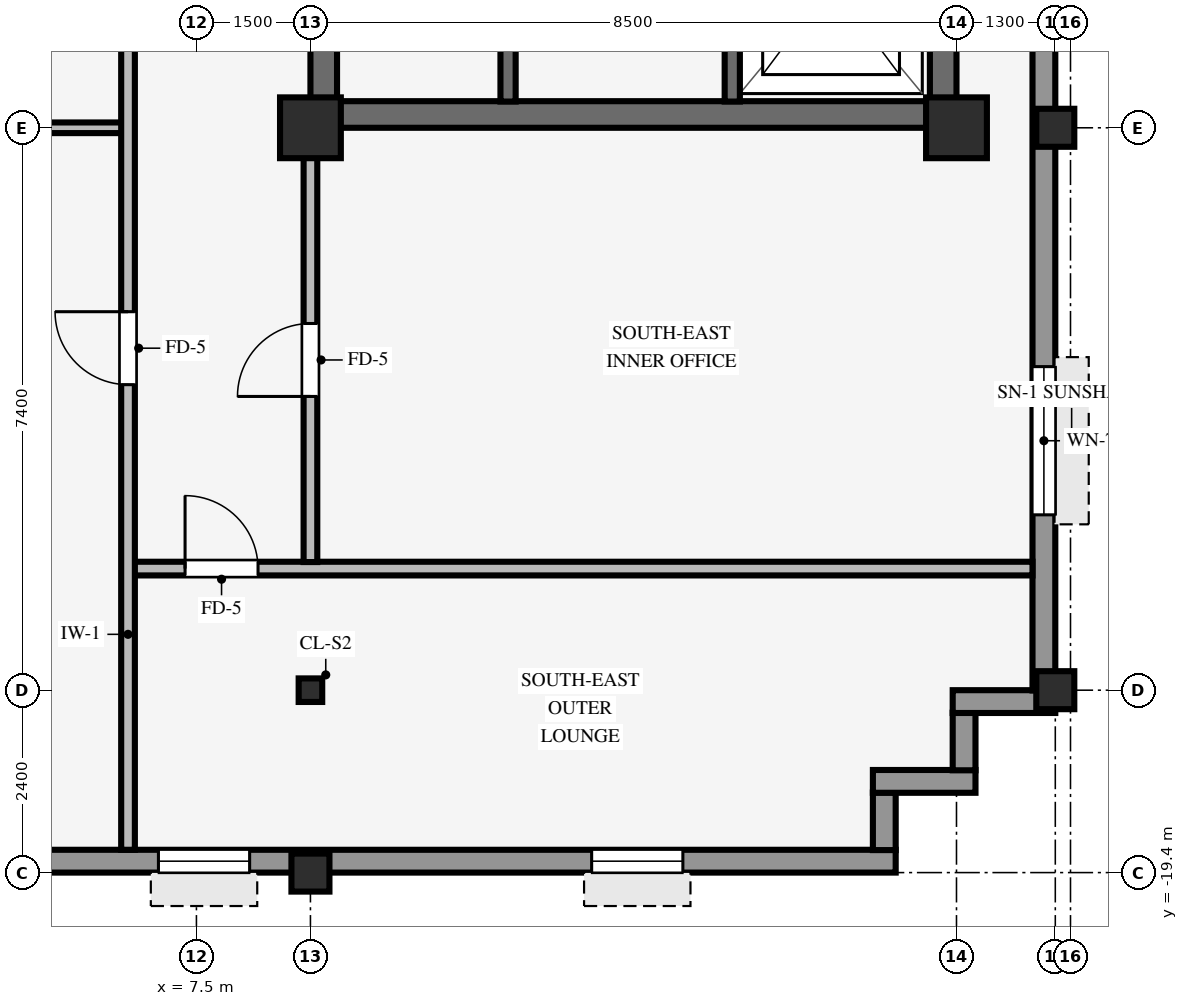
"""IFC4 building model, lengths in metres.
Left out: names, types, materials, properties, quantities, classifications, styles, units other than length and angle.
Written with IfcOpenShell. Run it as: python <this file> out.ifc"""

import sys

from ifc_helpers import new_model, si_unit, direction, frame, frame_2d, origin, origin_2d, place, context, subcontext, project, spatial, rectangle, hollow_rectangle, i_section, extrude, source, transform, mapped, element, fill, save


model = new_model("IFC4")
c1 = context("Model", 3, precision=1e-05, world=origin(), true_north=direction((0.0, 1.0)))
c2 = subcontext(c1, "Body", "Model", "MODEL_VIEW")
j1 = project(units=[si_unit("LENGTHUNIT", "METRE"), si_unit("PLANEANGLEUNIT", "RADIAN")], contexts=[c1])
p1 = place(None, origin())
s1 = spatial("IfcSite", under=j1, at=p1, CompositionType="ELEMENT")
p2 = place(p1, origin())
s2 = spatial("IfcBuilding", under=s1, at=p2, CompositionType="ELEMENT")
p3 = place(p2, frame((0.0, 0.0, 272.55)))
s3 = spatial("IfcBuildingStorey", under=s2, at=p3, CompositionType="ELEMENT", Elevation=272.55)
p4 = place(p3, frame((9.0, -9.425, 0.0), z_axis=(0.0, 0.0, 1.0), x_axis=(1.0, 0.0, 0.0)))
e1 = element("IfcWall", 1, at=p4, inside=s3, PredefinedType="SHEAR", context=c2, shape_type="SweptSolid", body=[
    extrude(rectangle(XDim=8.5, YDim=0.35, at=frame_2d((4.25, 0.0))), origin(), (0.0, 0.0, 1.0), 3.37),
])
p5 = place(p3, frame((9.175, -9.255, 0.0), z_axis=(0.0, 0.0, 1.0), x_axis=(0.0, 1.0, 0.0)))
e2 = element("IfcWall", 2, at=p5, inside=s3, PredefinedType="SHEAR", context=c2, shape_type="SweptSolid", body=[
    extrude(rectangle(XDim=18.51, YDim=0.35, at=frame_2d((9.255, 0.0))), origin(), (0.0, 0.0, 1.0), 3.37),
])
p6 = place(p5, frame((8.655, 0.0, 0.0)))
e3 = element("IfcOpeningElement", 3, at=p6, cuts=e2, PredefinedType="OPENING", context=c2, shape_type="SweptSolid", body=[
    extrude(rectangle(XDim=1.2, YDim=2.15, at=frame_2d((0.6, 1.075))), frame((0.0, 0.185, 0.0), z_axis=(0.0, -1.0, 0.0), x_axis=(1.0, 0.0, 0.0)), (0.0, 0.0, 1.0), 0.37),
])
p7 = place(p3, frame((17.325, -9.255, 0.0), z_axis=(0.0, 0.0, 1.0), x_axis=(0.0, 1.0, 0.0)))
e4 = element("IfcWall", 4, at=p7, inside=s3, PredefinedType="SHEAR", context=c2, shape_type="SweptSolid", body=[
    extrude(rectangle(XDim=18.51, YDim=0.35, at=frame_2d((9.255, 0.0))), origin(), (0.0, 0.0, 1.0), 3.37),
])
for number, where, z_axis, x_axis in (
    (5, (9.0, -9.6, 0.0), (0.0, 0.0, 1.0), (1.0, 0.0, 0.0)),
    (6, (17.5, -9.6, 0.0), (0.0, 0.0, 1.0), (1.0, 0.0, 0.0)),
):
    element("IfcColumn", number, at=place(p3, frame(where, z_axis=z_axis, x_axis=x_axis)), inside=s3, PredefinedType="COLUMN", context=c2, shape_type="SweptSolid", body=[
        extrude(rectangle(XDim=0.8, YDim=0.8, at=origin_2d()), origin(), (0.0, 0.0, 1.0), 3.37),
    ])
for number, where, z_axis, x_axis in (
    (7, (18.8, -17.0, 0.0), (0.0, 0.0, 1.0), (1.0, 0.0, 0.0)),
    (8, (18.8, -9.6, 0.0), (0.0, 0.0, 1.0), (1.0, 0.0, 0.0)),
    (9, (9.0, -19.4, 0.0), (0.0, 0.0, 1.0), (1.0, 0.0, 0.0)),
):
    element("IfcColumn", number, at=place(p3, frame(where, z_axis=z_axis, x_axis=x_axis)), inside=s3, PredefinedType="COLUMN", context=c2, shape_type="SweptSolid", body=[
        extrude(hollow_rectangle(XDim=0.5, YDim=0.5, WallThickness=0.032, InnerFilletRadius=0.032, OuterFilletRadius=0.064, at=origin_2d()), origin(), (0.0, 0.0, 1.0), 3.37),
    ])
p8 = place(p3, frame((9.0, -17.0, 0.0), z_axis=(0.0, 0.0, 1.0), x_axis=(1.0, 0.0, 0.0)))
e10 = element("IfcColumn", 10, at=p8, inside=s3, PredefinedType="COLUMN", context=c2, shape_type="SweptSolid", body=[
    extrude(i_section(OverallWidth=0.31, OverallDepth=0.31, WebThickness=0.015, FlangeThickness=0.015, FilletRadius=0.015, at=origin_2d()), origin(), (0.0, 0.0, 1.0), 3.37),
])
p9 = place(p3, frame((-18.9, -19.25, 0.0), z_axis=(0.0, 0.0, 1.0), x_axis=(1.0, 0.0, 0.0)))
e11 = element("IfcWall", 11, at=p9, inside=s3, PredefinedType="STANDARD", context=c2, shape_type="SweptSolid", body=[
    extrude(rectangle(XDim=35.6, YDim=0.3, at=frame_2d((17.8, 0.0))), origin(), (0.0, 0.0, 1.0), 2.705),
])
p10 = place(p9, frame((1.9, 0.0, 0.8)))
e12 = element("IfcOpeningElement", 12, at=p10, cuts=e11, PredefinedType="OPENING", context=c2, shape_type="SweptSolid", body=[
    extrude(rectangle(XDim=1.2, YDim=1.48, at=frame_2d((0.6, 0.74))), frame((0.0, 0.16, 0.0), z_axis=(0.0, -1.0, 0.0), x_axis=(1.0, 0.0, 0.0)), (0.0, 0.0, 1.0), 0.32),
])
p11 = place(p9, frame((7.6, 0.0, 0.8)))
e13 = element("IfcOpeningElement", 13, at=p11, cuts=e11, PredefinedType="OPENING", context=c2, shape_type="SweptSolid", body=[
    extrude(rectangle(XDim=1.2, YDim=1.48, at=frame_2d((0.6, 0.74))), frame((0.0, 0.16, 0.0), z_axis=(0.0, -1.0, 0.0), x_axis=(1.0, 0.0, 0.0)), (0.0, 0.0, 1.0), 0.32),
])
p12 = place(p9, frame((12.85, 0.0, 0.8)))
e14 = element("IfcOpeningElement", 14, at=p12, cuts=e11, PredefinedType="OPENING", context=c2, shape_type="SweptSolid", body=[
    extrude(rectangle(XDim=1.2, YDim=1.48, at=frame_2d((0.6, 0.74))), frame((0.0, 0.16, 0.0), z_axis=(0.0, -1.0, 0.0), x_axis=(1.0, 0.0, 0.0)), (0.0, 0.0, 1.0), 0.32),
])
p13 = place(p9, frame((22.0, 0.0, 0.8)))
e15 = element("IfcOpeningElement", 15, at=p13, cuts=e11, PredefinedType="OPENING", context=c2, shape_type="SweptSolid", body=[
    extrude(rectangle(XDim=1.2, YDim=1.48, at=frame_2d((0.6, 0.74))), frame((0.0, 0.16, 0.0), z_axis=(0.0, -1.0, 0.0), x_axis=(1.0, 0.0, 0.0)), (0.0, 0.0, 1.0), 0.32),
])
p14 = place(p9, frame((25.9, 0.0, 0.8)))
e16 = element("IfcOpeningElement", 16, at=p14, cuts=e11, PredefinedType="OPENING", context=c2, shape_type="SweptSolid", body=[
    extrude(rectangle(XDim=1.2, YDim=1.48, at=frame_2d((0.6, 0.74))), frame((0.0, 0.16, 0.0), z_axis=(0.0, -1.0, 0.0), x_axis=(1.0, 0.0, 0.0)), (0.0, 0.0, 1.0), 0.32),
])
p15 = place(p9, frame((31.6, 0.0, 0.8)))
e17 = element("IfcOpeningElement", 17, at=p15, cuts=e11, PredefinedType="OPENING", context=c2, shape_type="SweptSolid", body=[
    extrude(rectangle(XDim=1.2, YDim=1.48, at=frame_2d((0.6, 0.74))), frame((0.0, 0.16, 0.0), z_axis=(0.0, -1.0, 0.0), x_axis=(1.0, 0.0, 0.0)), (0.0, 0.0, 1.0), 0.32),
])
p16 = place(p3, frame((16.55, -19.104, 0.0), z_axis=(0.0, 0.0, 1.0), x_axis=(0.0, 1.0, 0.0)))
e18 = element("IfcWall", 18, at=p16, inside=s3, PredefinedType="STANDARD", context=c2, shape_type="SweptSolid", body=[
    extrude(rectangle(XDim=0.758, YDim=0.3, at=frame_2d((0.379, 0.0))), origin(), (0.0, 0.0, 1.0), 2.892),
])
p17 = place(p3, frame((16.4, -18.2, 0.0), z_axis=(0.0, 0.0, 1.0), x_axis=(1.0, 0.0, 0.0)))
e19 = element("IfcWall", 19, at=p17, inside=s3, PredefinedType="STANDARD", context=c2, shape_type="SweptSolid", body=[
    extrude(rectangle(XDim=1.35, YDim=0.3, at=frame_2d((0.675, 0.0))), origin(), (0.0, 0.0, 1.0), 2.892),
])
p18 = place(p3, frame((17.6, -18.054, 0.0), z_axis=(0.0, 0.0, 1.0), x_axis=(0.0, 1.0, 0.0)))
e20 = element("IfcWall", 20, at=p18, inside=s3, PredefinedType="STANDARD", context=c2, shape_type="SweptSolid", body=[
    extrude(rectangle(XDim=0.758, YDim=0.3, at=frame_2d((0.379, 0.0))), origin(), (0.0, 0.0, 1.0), 2.892),
])
p19 = place(p3, frame((17.45, -17.15, 0.0), z_axis=(0.0, 0.0, 1.0), x_axis=(1.0, 0.0, 0.0)))
e21 = element("IfcWall", 21, at=p19, inside=s3, PredefinedType="STANDARD", context=c2, shape_type="SweptSolid", body=[
    extrude(rectangle(XDim=1.35, YDim=0.3, at=frame_2d((0.675, 0.0))), origin(), (0.0, 0.0, 1.0), 2.892),
])
p20 = place(p3, frame((18.65, -17.004, 0.0), z_axis=(0.0, 0.0, 1.0), x_axis=(0.0, 1.0, 0.0)))
e22 = element("IfcWall", 22, at=p20, inside=s3, PredefinedType="STANDARD", context=c2, shape_type="SweptSolid", body=[
    extrude(rectangle(XDim=34.008, YDim=0.3, at=frame_2d((17.004, 0.0))), origin(), (0.0, 0.0, 1.0), 2.705),
])
p21 = place(p20, frame((2.311, 0.0, 0.8)))
e23 = element("IfcOpeningElement", 23, at=p21, cuts=e22, PredefinedType="OPENING", context=c2, shape_type="SweptSolid", body=[
    extrude(rectangle(XDim=1.95, YDim=1.48, at=frame_2d((0.975, 0.74))), frame((0.0, 0.16, 0.0), z_axis=(0.0, -1.0, 0.0), x_axis=(1.0, 0.0, 0.0)), (0.0, 0.0, 1.0), 0.32),
])
p22 = place(p20, frame((29.747, 0.0, 0.8)))
e24 = element("IfcOpeningElement", 24, at=p22, cuts=e22, PredefinedType="OPENING", context=c2, shape_type="SweptSolid", body=[
    extrude(rectangle(XDim=1.95, YDim=1.48, at=frame_2d((0.975, 0.74))), frame((0.0, 0.16, 0.0), z_axis=(0.0, -1.0, 0.0), x_axis=(1.0, 0.0, 0.0)), (0.0, 0.0, 1.0), 0.32),
])
p23 = place(p3, frame((14.55, -9.255, 0.0), z_axis=(0.0, 0.0, 1.0), x_axis=(0.0, 1.0, 0.0)))
e25 = element("IfcWall", 25, at=p23, inside=s3, PredefinedType="SHEAR", context=c2, shape_type="SweptSolid", body=[
    extrude(rectangle(XDim=10.16, YDim=0.2, at=frame_2d((5.08, 0.0))), origin(), (0.0, 0.0, 1.0), 3.37),
])
p24 = place(p23, frame((6.615, 0.0, 0.0)))
e26 = element("IfcOpeningElement", 26, at=p24, cuts=e25, PredefinedType="OPENING", context=c2, shape_type="SweptSolid", body=[
    extrude(rectangle(XDim=0.88, YDim=2.1, at=frame_2d((0.44, 1.05))), frame((0.0, 0.11, 0.0), z_axis=(0.0, -1.0, 0.0), x_axis=(1.0, 0.0, 0.0)), (0.0, 0.0, 1.0), 0.22),
])
p25 = place(p23, frame((0.98, 0.0, 0.0)))
e27 = element("IfcOpeningElement", 27, at=p25, cuts=e25, PredefinedType="OPENING", context=c2, shape_type="SweptSolid", body=[
    extrude(rectangle(XDim=1.15, YDim=2.15, at=frame_2d((0.575, 1.075))), frame((0.0, 0.11, 0.0), z_axis=(0.0, -1.0, 0.0), x_axis=(1.0, 0.0, 0.0)), (0.0, 0.0, 1.0), 0.22),
])
p26 = place(p3, frame((11.6, -9.255, 0.0), z_axis=(0.0, 0.0, 1.0), x_axis=(0.0, 1.0, 0.0)))
e28 = element("IfcWall", 28, at=p26, inside=s3, PredefinedType="SHEAR", context=c2, shape_type="SweptSolid", body=[
    extrude(rectangle(XDim=8.025, YDim=0.2, at=frame_2d((4.012, 0.0))), origin(), (0.0, 0.0, 1.0), 3.37),
])
p27 = place(p26, frame((5.615, 0.0, 0.0)))
e29 = element("IfcOpeningElement", 29, at=p27, cuts=e28, PredefinedType="OPENING", context=c2, shape_type="SweptSolid", body=[
    extrude(rectangle(XDim=0.88, YDim=2.1, at=frame_2d((0.44, 1.05))), frame((0.0, 0.11, 0.0), z_axis=(0.0, -1.0, 0.0), x_axis=(1.0, 0.0, 0.0)), (0.0, 0.0, 1.0), 0.22),
])
p28 = place(p3, frame((6.661, -15.4, 0.0), z_axis=(0.0, 0.0, 1.0), x_axis=(1.0, 0.0, 0.0)))
e30 = element("IfcWall", 30, at=p28, inside=s3, PredefinedType="PARTITIONING", context=c2, shape_type="SweptSolid", body=[
    extrude(rectangle(XDim=11.839, YDim=0.18, at=frame_2d((5.919, 0.0))), origin(), (0.0, 0.0, 1.0), 3.36),
])
p29 = place(p28, frame((0.689, 0.0, 0.0)))
e31 = element("IfcOpeningElement", 31, at=p29, cuts=e30, PredefinedType="OPENING", context=c2, shape_type="SweptSolid", body=[
    extrude(rectangle(XDim=0.96, YDim=2.1, at=frame_2d((0.48, 1.05))), frame((0.0, 0.1, 0.0), z_axis=(0.0, -1.0, 0.0), x_axis=(1.0, 0.0, 0.0)), (0.0, 0.0, 1.0), 0.2),
])
p30 = place(p3, frame((0.151, -9.6, 0.0), z_axis=(0.0, 0.0, 1.0), x_axis=(1.0, 0.0, 0.0)))
e32 = element("IfcWall", 32, at=p30, inside=s3, PredefinedType="PARTITIONING", context=c2, shape_type="SweptSolid", body=[
    extrude(rectangle(XDim=6.388, YDim=0.14, at=frame_2d((3.194, 0.0))), origin(), (0.0, 0.0, 1.0), 2.405),
])
p31 = place(p3, frame((6.6, -19.1, 0.0), z_axis=(0.0, 0.0, 1.0), x_axis=(0.0, 1.0, 0.0)))
e33 = element("IfcWall", 33, at=p31, inside=s3, PredefinedType="PARTITIONING", context=c2, shape_type="SweptSolid", body=[
    extrude(rectangle(XDim=17.764, YDim=0.18, at=frame_2d((8.882, 0.0))), origin(), (0.0, 0.0, 1.0), 3.36),
])
p32 = place(p31, frame((13.152, 0.0, 0.0)))
e34 = element("IfcOpeningElement", 34, at=p32, cuts=e33, PredefinedType="OPENING", context=c2, shape_type="SweptSolid", body=[
    extrude(rectangle(XDim=0.96, YDim=2.1, at=frame_2d((0.48, 1.05))), frame((0.0, 0.1, 0.0), z_axis=(0.0, -1.0, 0.0), x_axis=(1.0, 0.0, 0.0)), (0.0, 0.0, 1.0), 0.2),
])
p33 = place(p31, frame((6.12, 0.0, 0.0)))
e35 = element("IfcOpeningElement", 35, at=p33, cuts=e33, PredefinedType="OPENING", context=c2, shape_type="SweptSolid", body=[
    extrude(rectangle(XDim=0.96, YDim=2.1, at=frame_2d((0.48, 1.05))), frame((0.0, 0.1, 0.0), z_axis=(0.0, -1.0, 0.0), x_axis=(1.0, 0.0, 0.0)), (0.0, 0.0, 1.0), 0.2),
])
p34 = place(p3, frame((9.0, -15.314, 0.0), z_axis=(0.0, 0.0, 1.0), x_axis=(0.0, 1.0, 0.0)))
e36 = element("IfcWall", 36, at=p34, inside=s3, PredefinedType="PARTITIONING", context=c2, shape_type="SweptSolid", body=[
    extrude(rectangle(XDim=5.318, YDim=0.18, at=frame_2d((2.659, 0.0))), origin(), (0.0, 0.0, 1.0), 2.892),
])
p35 = place(p34, frame((2.179, 0.0, 0.0)))
e37 = element("IfcOpeningElement", 37, at=p35, cuts=e36, PredefinedType="OPENING", context=c2, shape_type="SweptSolid", body=[
    extrude(rectangle(XDim=0.96, YDim=2.1, at=frame_2d((0.48, 1.05))), frame((0.0, 0.1, 0.0), z_axis=(0.0, -1.0, 0.0), x_axis=(1.0, 0.0, 0.0)), (0.0, 0.0, 1.0), 0.2),
])
m1 = source(origin(), c2, "Body", "SweptSolid", [
    extrude(rectangle(XDim=1.2, YDim=1.48, at=frame_2d((0.6, 0.74))), frame((0.0, 0.03, 0.0), z_axis=(0.0, -1.0, 0.0), x_axis=(1.0, 0.0, 0.0)), (0.0, 0.0, 1.0), 0.06),
])
p36 = place(p14, origin())
e38 = element("IfcWindow", 38, at=p36, inside=s3, PartitioningType="SINGLE_PANEL", PredefinedType="WINDOW", context=c2, shape_type="MappedRepresentation", body=[
    mapped(m1, transform((0.0, 0.0, 0.0), scale=1.0)),
])
fill(e16, e38)
p37 = place(p15, origin())
e39 = element("IfcWindow", 39, at=p37, inside=s3, PartitioningType="SINGLE_PANEL", PredefinedType="WINDOW", context=c2, shape_type="MappedRepresentation", body=[
    mapped(m1, transform((0.0, 0.0, 0.0), scale=1.0)),
])
fill(e17, e39)
m2 = source(origin(), c2, "Body", "SweptSolid", [
    extrude(rectangle(XDim=1.95, YDim=1.48, at=frame_2d((0.975, 0.74))), frame((0.0, 0.03, 0.0), z_axis=(0.0, -1.0, 0.0), x_axis=(1.0, 0.0, 0.0)), (0.0, 0.0, 1.0), 0.06),
])
p38 = place(p21, origin())
e40 = element("IfcWindow", 40, at=p38, inside=s3, PartitioningType="SINGLE_PANEL", PredefinedType="WINDOW", context=c2, shape_type="MappedRepresentation", body=[
    mapped(m2, transform((0.0, 0.0, 0.0), scale=1.0)),
])
fill(e23, e40)
m3 = source(origin(), c2, "Body", "SweptSolid", [
    extrude(rectangle(XDim=0.96, YDim=2.1, at=frame_2d((0.48, 1.05))), frame((0.0, 0.025, 0.0), z_axis=(0.0, -1.0, 0.0), x_axis=(1.0, 0.0, 0.0)), (0.0, 0.0, 1.0), 0.05),
])
p39 = place(p33, origin())
e41 = element("IfcDoor", 41, at=p39, inside=s3, OperationType="SINGLE_SWING_RIGHT", PredefinedType="DOOR", context=c2, shape_type="MappedRepresentation", body=[
    mapped(m3, transform((0.0, 0.0, 0.0), scale=1.0)),
])
fill(e35, e41)
p40 = place(p35, origin())
e42 = element("IfcDoor", 42, at=p40, inside=s3, OperationType="SINGLE_SWING_LEFT", PredefinedType="DOOR", context=c2, shape_type="MappedRepresentation", body=[
    mapped(m3, transform((0.0, 0.0, 0.0), scale=1.0)),
])
fill(e37, e42)
p41 = place(p29, origin())
e43 = element("IfcDoor", 43, at=p41, inside=s3, OperationType="SINGLE_SWING_LEFT", PredefinedType="DOOR", context=c2, shape_type="MappedRepresentation", body=[
    mapped(m3, transform((0.0, 0.0, 0.0), scale=1.0)),
])
fill(e31, e43)
save(model, sys.argv[1])
